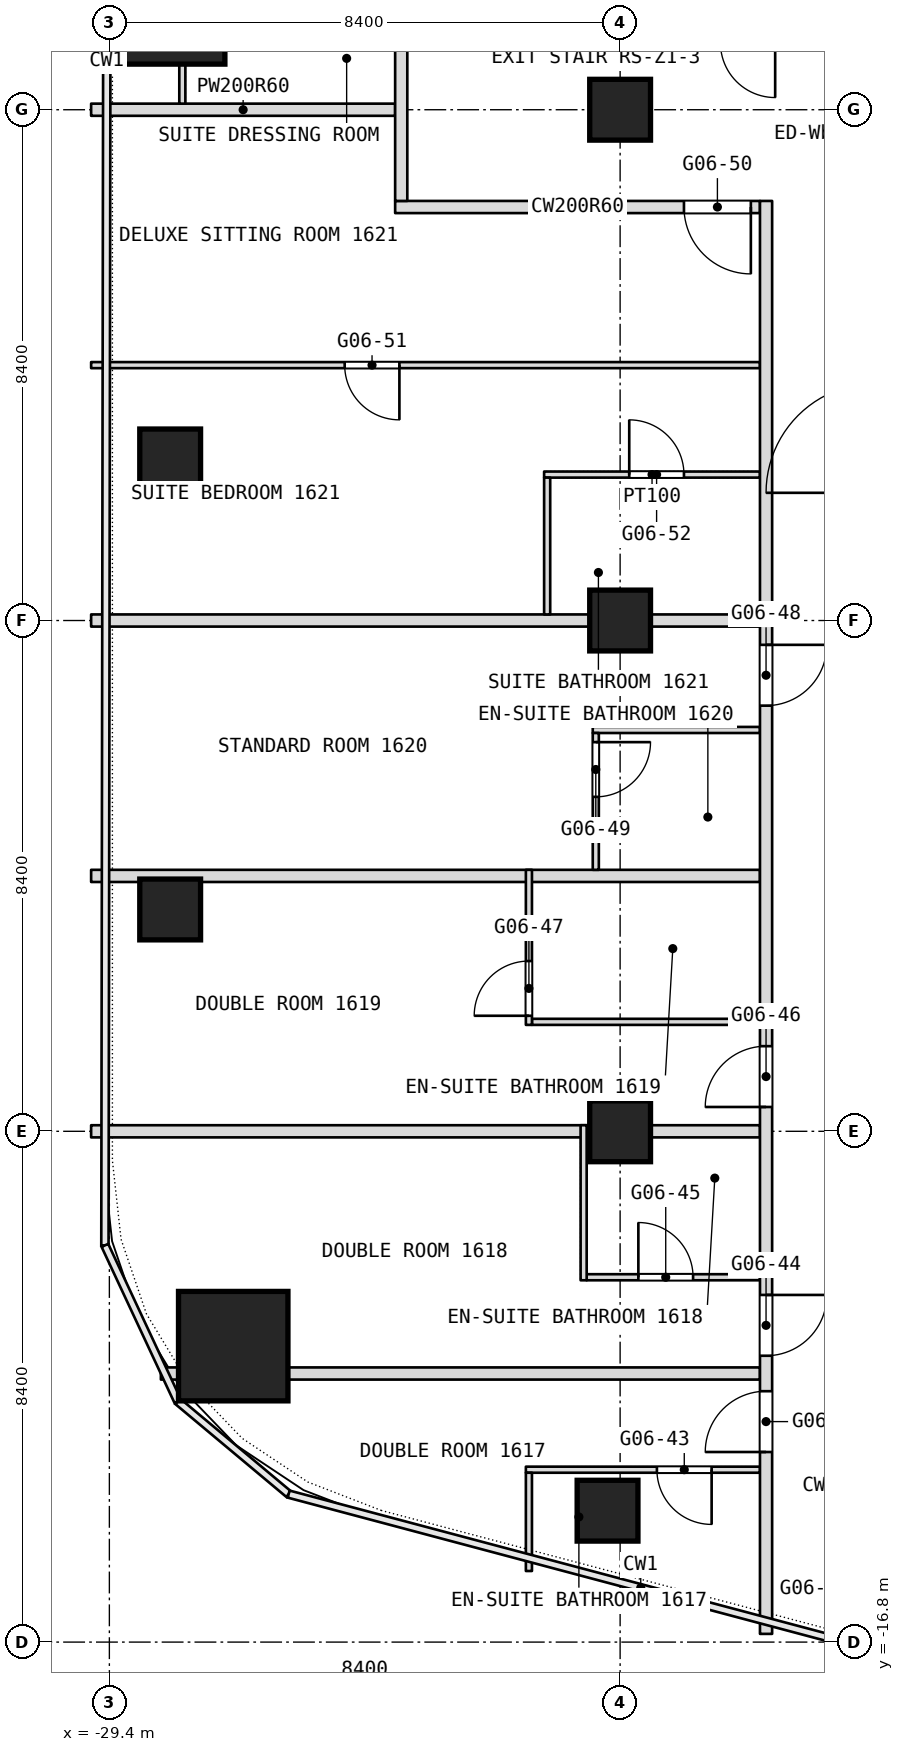
"""IFC4 building model, lengths in metres.
Left out: names, types, materials, properties, quantities, classifications, styles, units other than length and angle.
Written with IfcOpenShell. Run it as: python <this file> out.ifc"""

import sys

from ifc_helpers import new_model, si_unit, direction, frame, frame_2d, origin, origin_2d, place, context, subcontext, project, spatial, rectangle, extrude, element, fill, save


model = new_model("IFC4")
c1 = context("Model", 3, precision=1e-05, world=origin(), true_north=direction((0.0, 1.0)))
c2 = subcontext(c1, "Body", "Model", "MODEL_VIEW")
j1 = project(units=[si_unit("LENGTHUNIT", "METRE"), si_unit("PLANEANGLEUNIT", "RADIAN")], contexts=[c1])
p1 = place(None, origin())
s1 = spatial("IfcSite", under=j1, at=p1, CompositionType="ELEMENT")
p2 = place(p1, origin())
s2 = spatial("IfcBuilding", under=s1, at=p2, CompositionType="ELEMENT")
p3 = place(p2, frame((0.0, 0.0, 72.5)))
s3 = spatial("IfcBuildingStorey", under=s2, at=p3, CompositionType="ELEMENT", Elevation=72.5)
for number, where, z_axis, x_axis in (
    (1, (-27.363, -11.933, 0.0), (0.0, 0.0, 1.0), (1.0, 0.0, 0.0)),
    (2, (-28.4, 10.05, 0.0), (0.0, 0.0, 1.0), (1.0, 0.0, 0.0)),
):
    element("IfcColumn", number, at=place(p3, frame(where, z_axis=z_axis, x_axis=x_axis)), inside=s3, PredefinedType="COLUMN", context=c2, shape_type="SweptSolid", body=[
        extrude(rectangle(XDim=1.8, YDim=1.8, at=origin_2d()), origin(), (0.0, 0.0, 1.0), 3.6),
    ])
for number, where, z_axis, x_axis in (
    (3, (-21.0, -8.4, 0.0), (0.0, 0.0, 1.0), (1.0, 0.0, 0.0)),
    (4, (-21.0, 0.0, 0.0), (0.0, 0.0, 1.0), (1.0, 0.0, 0.0)),
    (5, (-21.0, 8.4, 0.0), (0.0, 0.0, 1.0), (1.0, 0.0, 0.0)),
    (6, (-28.4, -4.752, 0.0), (0.0, 0.0, 1.0), (1.0, 0.0, 0.0)),
    (7, (-28.4, 2.649, 0.0), (0.0, 0.0, 1.0), (1.0, 0.0, 0.0)),
    (8, (-21.207, -14.639, 0.0), (0.0, 0.0, 1.0), (1.0, 0.0, 0.0)),
):
    element("IfcColumn", number, at=place(p3, frame(where, z_axis=z_axis, x_axis=x_axis)), inside=s3, PredefinedType="COLUMN", context=c2, shape_type="SweptSolid", body=[
        extrude(rectangle(XDim=1.0, YDim=1.0, at=origin_2d()), origin(), (0.0, 0.0, 1.0), 3.6),
    ])
p4 = place(p3, frame((-22.55, -13.965, 0.0), z_axis=(0.0, 0.0, 1.0), x_axis=(1.0, 0.0, 0.0)))
e9 = element("IfcWall", 9, at=p4, inside=s3, PredefinedType="PARTITIONING", context=c2, shape_type="SweptSolid", body=[
    extrude(rectangle(XDim=3.85, YDim=0.1, at=frame_2d((1.925, 0.0))), origin(), (0.0, 0.0, 1.0), 3.34),
])
p5 = place(p4, frame((2.155, 0.0, 0.0)))
e10 = element("IfcOpeningElement", 10, at=p5, cuts=e9, PredefinedType="OPENING", context=c2, shape_type="SweptSolid", body=[
    extrude(rectangle(XDim=0.9, YDim=2.1, at=frame_2d((0.45, 1.05))), frame((0.0, 0.05, 0.0), z_axis=(0.0, -1.0, 0.0), x_axis=(1.0, 0.0, 0.0)), (0.0, 0.0, 1.0), 0.1),
])
p6 = place(p3, frame((-28.553, -12.383, 0.0), z_axis=(0.0, 0.0, 1.0), x_axis=(1.0, 0.0, 0.0)))
e11 = element("IfcWall", 11, at=p6, inside=s3, PredefinedType="PARTITIONING", context=c2, shape_type="SweptSolid", body=[
    extrude(rectangle(XDim=0.29, YDim=0.2, at=frame_2d((0.145, 0.0))), origin(), (0.0, 0.0, 1.0), 3.34),
])
p7 = place(p3, frame((-26.463, -12.383, 0.0), z_axis=(0.0, 0.0, 1.0), x_axis=(1.0, 0.0, 0.0)))
e12 = element("IfcWall", 12, at=p7, inside=s3, PredefinedType="PARTITIONING", context=c2, shape_type="SweptSolid", body=[
    extrude(rectangle(XDim=7.763, YDim=0.2, at=frame_2d((3.881, 0.0))), origin(), (0.0, 0.0, 1.0), 3.34),
])
p8 = place(p3, frame((-21.55, -10.8, 0.0), z_axis=(0.0, 0.0, 1.0), x_axis=(1.0, 0.0, 0.0)))
e13 = element("IfcWall", 13, at=p8, inside=s3, PredefinedType="PARTITIONING", context=c2, shape_type="SweptSolid", body=[
    extrude(rectangle(XDim=2.85, YDim=0.1, at=frame_2d((1.425, 0.0))), origin(), (0.0, 0.0, 1.0), 3.34),
])
p9 = place(p8, frame((0.85, 0.0, 0.0)))
e14 = element("IfcOpeningElement", 14, at=p9, cuts=e13, PredefinedType="OPENING", context=c2, shape_type="SweptSolid", body=[
    extrude(rectangle(XDim=0.9, YDim=2.1, at=frame_2d((0.45, 1.05))), frame((0.0, 0.05, 0.0), z_axis=(0.0, -1.0, 0.0), x_axis=(1.0, 0.0, 0.0)), (0.0, 0.0, 1.0), 0.1),
])
p10 = place(p3, frame((-29.7, -8.4, 0.0), z_axis=(0.0, 0.0, 1.0), x_axis=(1.0, 0.0, 0.0)))
e15 = element("IfcWall", 15, at=p10, inside=s3, PredefinedType="PARTITIONING", context=c2, shape_type="SweptSolid", body=[
    extrude(rectangle(XDim=11.0, YDim=0.2, at=frame_2d((5.5, 0.0))), origin(), (0.0, 0.0, 1.0), 2.84),
])
p11 = place(p3, frame((-22.45, -6.6, 0.0), z_axis=(0.0, 0.0, 1.0), x_axis=(1.0, 0.0, 0.0)))
e16 = element("IfcWall", 16, at=p11, inside=s3, PredefinedType="PARTITIONING", context=c2, shape_type="SweptSolid", body=[
    extrude(rectangle(XDim=3.75, YDim=0.1, at=frame_2d((1.875, 0.0))), origin(), (0.0, 0.0, 1.0), 3.34),
])
p12 = place(p3, frame((-29.7, -4.2, 0.0), z_axis=(0.0, 0.0, 1.0), x_axis=(1.0, 0.0, 0.0)))
e17 = element("IfcWall", 17, at=p12, inside=s3, PredefinedType="PARTITIONING", context=c2, shape_type="SweptSolid", body=[
    extrude(rectangle(XDim=11.0, YDim=0.2, at=frame_2d((5.5, 0.0))), origin(), (0.0, 0.0, 1.0), 3.34),
])
p13 = place(p3, frame((-21.45, -1.8, 0.0), z_axis=(0.0, 0.0, 1.0), x_axis=(1.0, 0.0, 0.0)))
e18 = element("IfcWall", 18, at=p13, inside=s3, PredefinedType="PARTITIONING", context=c2, shape_type="SweptSolid", body=[
    extrude(rectangle(XDim=2.75, YDim=0.1, at=frame_2d((1.375, 0.0))), origin(), (0.0, 0.0, 1.0), 3.34),
])
p14 = place(p3, frame((-29.7, 0.0, 0.0), z_axis=(0.0, 0.0, 1.0), x_axis=(1.0, 0.0, 0.0)))
e19 = element("IfcWall", 19, at=p14, inside=s3, PredefinedType="PARTITIONING", context=c2, shape_type="SweptSolid", body=[
    extrude(rectangle(XDim=11.0, YDim=0.2, at=frame_2d((5.5, 0.0))), origin(), (0.0, 0.0, 1.0), 2.84),
])
p15 = place(p3, frame((-22.25, 2.4, 0.0), z_axis=(0.0, 0.0, 1.0), x_axis=(1.0, 0.0, 0.0)))
e20 = element("IfcWall", 20, at=p15, inside=s3, PredefinedType="PARTITIONING", context=c2, shape_type="SweptSolid", body=[
    extrude(rectangle(XDim=3.55, YDim=0.1, at=frame_2d((1.775, 0.0))), origin(), (0.0, 0.0, 1.0), 3.34),
])
p16 = place(p15, frame((1.4, 0.0, 0.0)))
e21 = element("IfcOpeningElement", 21, at=p16, cuts=e20, PredefinedType="OPENING", context=c2, shape_type="SweptSolid", body=[
    extrude(rectangle(XDim=0.9, YDim=2.1, at=frame_2d((0.45, 1.05))), frame((0.0, 0.05, 0.0), z_axis=(0.0, -1.0, 0.0), x_axis=(1.0, 0.0, 0.0)), (0.0, 0.0, 1.0), 0.1),
])
p17 = place(p3, frame((-29.7, 4.2, 0.0), z_axis=(0.0, 0.0, 1.0), x_axis=(1.0, 0.0, 0.0)))
e22 = element("IfcWall", 22, at=p17, inside=s3, PredefinedType="PARTITIONING", context=c2, shape_type="SweptSolid", body=[
    extrude(rectangle(XDim=11.0, YDim=0.1, at=frame_2d((5.5, 0.0))), origin(), (0.0, 0.0, 1.0), 3.34),
])
p18 = place(p17, frame((4.17, 0.0, 0.0)))
e23 = element("IfcOpeningElement", 23, at=p18, cuts=e22, PredefinedType="OPENING", context=c2, shape_type="SweptSolid", body=[
    extrude(rectangle(XDim=0.9, YDim=2.1, at=frame_2d((0.45, 1.05))), frame((0.0, 0.05, 0.0), z_axis=(0.0, -1.0, 0.0), x_axis=(1.0, 0.0, 0.0)), (0.0, 0.0, 1.0), 0.1),
])
p19 = place(p3, frame((-24.7, 6.8, 0.0), z_axis=(0.0, 0.0, 1.0), x_axis=(1.0, 0.0, 0.0)))
e24 = element("IfcWall", 24, at=p19, inside=s3, PredefinedType="PARTITIONING", context=c2, shape_type="SweptSolid", body=[
    extrude(rectangle(XDim=6.0, YDim=0.2, at=frame_2d((3.0, 0.0))), origin(), (0.0, 0.0, 1.0), 3.34),
])
p20 = place(p19, frame((4.75, 0.0, 0.0)))
e25 = element("IfcOpeningElement", 25, at=p20, cuts=e24, PredefinedType="OPENING", context=c2, shape_type="SweptSolid", body=[
    extrude(rectangle(XDim=1.1, YDim=2.1, at=frame_2d((0.55, 1.05))), frame((0.0, 0.1, 0.0), z_axis=(0.0, -1.0, 0.0), x_axis=(1.0, 0.0, 0.0)), (0.0, 0.0, 1.0), 0.2),
])
p21 = place(p3, frame((-29.7, 8.4, 0.0), z_axis=(0.0, 0.0, 1.0), x_axis=(1.0, 0.0, 0.0)))
e26 = element("IfcWall", 26, at=p21, inside=s3, PredefinedType="PARTITIONING", context=c2, shape_type="SweptSolid", body=[
    extrude(rectangle(XDim=5.0, YDim=0.2, at=frame_2d((2.5, 0.0))), origin(), (0.0, 0.0, 1.0), 2.84),
])
p22 = place(p3, frame((-18.6, -16.665, 0.0), z_axis=(0.0, 0.0, 1.0), x_axis=(0.0, 1.0, 0.0)))
e27 = element("IfcWall", 27, at=p22, inside=s3, PredefinedType="PARTITIONING", context=c2, shape_type="SweptSolid", body=[
    extrude(rectangle(XDim=23.565, YDim=0.2, at=frame_2d((11.782, 0.0))), origin(), (0.0, 0.0, 1.0), 3.34),
])
p23 = place(p22, frame((2.991, 0.0, 0.0)))
e28 = element("IfcOpeningElement", 28, at=p23, cuts=e27, PredefinedType="OPENING", context=c2, shape_type="SweptSolid", body=[
    extrude(rectangle(XDim=1.0, YDim=2.1, at=frame_2d((0.5, 1.05))), frame((0.0, 0.1, 0.0), z_axis=(0.0, -1.0, 0.0), x_axis=(1.0, 0.0, 0.0)), (0.0, 0.0, 1.0), 0.2),
])
p24 = place(p22, frame((4.574, 0.0, 0.0)))
e29 = element("IfcOpeningElement", 29, at=p24, cuts=e27, PredefinedType="OPENING", context=c2, shape_type="SweptSolid", body=[
    extrude(rectangle(XDim=1.0, YDim=2.1, at=frame_2d((0.5, 1.05))), frame((0.0, 0.1, 0.0), z_axis=(0.0, -1.0, 0.0), x_axis=(1.0, 0.0, 0.0)), (0.0, 0.0, 1.0), 0.2),
])
p25 = place(p22, frame((8.665, 0.0, 0.0)))
e30 = element("IfcOpeningElement", 30, at=p25, cuts=e27, PredefinedType="OPENING", context=c2, shape_type="SweptSolid", body=[
    extrude(rectangle(XDim=1.0, YDim=2.1, at=frame_2d((0.5, 1.05))), frame((0.0, 0.1, 0.0), z_axis=(0.0, -1.0, 0.0), x_axis=(1.0, 0.0, 0.0)), (0.0, 0.0, 1.0), 0.2),
])
p26 = place(p22, frame((15.265, 0.0, 0.0)))
e31 = element("IfcOpeningElement", 31, at=p26, cuts=e27, PredefinedType="OPENING", context=c2, shape_type="SweptSolid", body=[
    extrude(rectangle(XDim=1.0, YDim=2.1, at=frame_2d((0.5, 1.05))), frame((0.0, 0.1, 0.0), z_axis=(0.0, -1.0, 0.0), x_axis=(1.0, 0.0, 0.0)), (0.0, 0.0, 1.0), 0.2),
])
p27 = place(p3, frame((-21.4, -4.1, 0.0), z_axis=(0.0, 0.0, 1.0), x_axis=(0.0, 1.0, 0.0)))
e32 = element("IfcWall", 32, at=p27, inside=s3, PredefinedType="PARTITIONING", context=c2, shape_type="SweptSolid", body=[
    extrude(rectangle(XDim=2.25, YDim=0.1, at=frame_2d((1.125, 0.0))), origin(), (0.0, 0.0, 1.0), 3.34),
])
p28 = place(p27, frame((1.2, 0.0, 0.0)))
e33 = element("IfcOpeningElement", 33, at=p28, cuts=e32, PredefinedType="OPENING", context=c2, shape_type="SweptSolid", body=[
    extrude(rectangle(XDim=0.9, YDim=2.1, at=frame_2d((0.45, 1.05))), frame((0.0, 0.05, 0.0), z_axis=(0.0, -1.0, 0.0), x_axis=(1.0, 0.0, 0.0)), (0.0, 0.0, 1.0), 0.1),
])
p29 = place(p3, frame((-21.6, -10.85, 0.0), z_axis=(0.0, 0.0, 1.0), x_axis=(0.0, 1.0, 0.0)))
e34 = element("IfcWall", 34, at=p29, inside=s3, PredefinedType="PARTITIONING", context=c2, shape_type="SweptSolid", body=[
    extrude(rectangle(XDim=2.55, YDim=0.1, at=frame_2d((1.275, 0.0))), origin(), (0.0, 0.0, 1.0), 3.34),
])
p30 = place(p3, frame((-22.2, 0.1, 0.0), z_axis=(0.0, 0.0, 1.0), x_axis=(0.0, 1.0, 0.0)))
e35 = element("IfcWall", 35, at=p30, inside=s3, PredefinedType="PARTITIONING", context=c2, shape_type="SweptSolid", body=[
    extrude(rectangle(XDim=2.25, YDim=0.1, at=frame_2d((1.125, 0.0))), origin(), (0.0, 0.0, 1.0), 3.34),
])
p31 = place(p3, frame((-22.5, -15.631, 0.0), z_axis=(0.0, 0.0, 1.0), x_axis=(0.0, 1.0, 0.0)))
e36 = element("IfcWall", 36, at=p31, inside=s3, PredefinedType="PARTITIONING", context=c2, shape_type="SweptSolid", body=[
    extrude(rectangle(XDim=1.616, YDim=0.1, at=frame_2d((0.808, 0.0))), origin(), (0.0, 0.0, 1.0), 3.34),
])
p32 = place(p3, frame((-22.5, -6.65, 0.0), z_axis=(0.0, 0.0, 1.0), x_axis=(0.0, 1.0, 0.0)))
e37 = element("IfcWall", 37, at=p32, inside=s3, PredefinedType="PARTITIONING", context=c2, shape_type="SweptSolid", body=[
    extrude(rectangle(XDim=2.55, YDim=0.1, at=frame_2d((1.275, 0.0))), origin(), (0.0, 0.0, 1.0), 3.34),
])
p33 = place(p32, frame((0.15, 0.0, 0.0)))
e38 = element("IfcOpeningElement", 38, at=p33, cuts=e37, PredefinedType="OPENING", context=c2, shape_type="SweptSolid", body=[
    extrude(rectangle(XDim=0.9, YDim=2.1, at=frame_2d((0.45, 1.05))), frame((0.0, 0.05, 0.0), z_axis=(0.0, -1.0, 0.0), x_axis=(1.0, 0.0, 0.0)), (0.0, 0.0, 1.0), 0.1),
])
p34 = place(p3, frame((-24.6, 6.9, 0.0), z_axis=(0.0, 0.0, 1.0), x_axis=(0.0, 1.0, 0.0)))
e39 = element("IfcWall", 39, at=p34, inside=s3, PredefinedType="PARTITIONING", context=c2, shape_type="SweptSolid", body=[
    extrude(rectangle(XDim=11.6, YDim=0.2, at=frame_2d((5.8, 0.0))), origin(), (0.0, 0.0, 1.0), 3.34),
])
p35 = place(p34, frame((5.1, 0.0, 0.0)))
e40 = element("IfcOpeningElement", 40, at=p35, cuts=e39, PredefinedType="OPENING", context=c2, shape_type="SweptSolid", body=[
    extrude(rectangle(XDim=1.1, YDim=2.1, at=frame_2d((0.55, 1.05))), frame((0.0, 0.1, 0.0), z_axis=(0.0, -1.0, 0.0), x_axis=(1.0, 0.0, 0.0)), (0.0, 0.0, 1.0), 0.2),
])
p36 = place(p34, frame((10.2, 0.0, 0.0)))
e41 = element("IfcOpeningElement", 41, at=p36, cuts=e39, PredefinedType="OPENING", context=c2, shape_type="SweptSolid", body=[
    extrude(rectangle(XDim=1.0, YDim=2.1, at=frame_2d((0.5, 1.05))), frame((0.0, 0.1, 0.0), z_axis=(0.0, -1.0, 0.0), x_axis=(1.0, 0.0, 0.0)), (0.0, 0.0, 1.0), 0.2),
])
p37 = place(p3, frame((-28.2, 8.5, 0.0), z_axis=(0.0, 0.0, 1.0), x_axis=(0.0, 1.0, 0.0)))
e42 = element("IfcWall", 42, at=p37, inside=s3, PredefinedType="PARTITIONING", context=c2, shape_type="SweptSolid", body=[
    extrude(rectangle(XDim=0.65, YDim=0.1, at=frame_2d((0.325, 0.0))), origin(), (0.0, 0.0, 1.0), 2.94),
])
p38 = place(p5, origin())
e43 = element("IfcDoor", 43, at=p38, inside=s3, OperationType="SINGLE_SWING_RIGHT", PredefinedType="DOOR", context=c2, shape_type="SweptSolid", body=[
    extrude(rectangle(XDim=0.9, YDim=2.1, at=frame_2d((0.45, 1.05))), frame((0.0, 0.025, 0.0), z_axis=(0.0, -1.0, 0.0), x_axis=(1.0, 0.0, 0.0)), (0.0, 0.0, 1.0), 0.05),
])
fill(e10, e43)
p39 = place(p9, origin())
e44 = element("IfcDoor", 44, at=p39, inside=s3, OperationType="SINGLE_SWING_LEFT", PredefinedType="DOOR", context=c2, shape_type="SweptSolid", body=[
    extrude(rectangle(XDim=0.9, YDim=2.1, at=frame_2d((0.45, 1.05))), frame((0.0, 0.025, 0.0), z_axis=(0.0, -1.0, 0.0), x_axis=(1.0, 0.0, 0.0)), (0.0, 0.0, 1.0), 0.05),
])
fill(e14, e44)
p40 = place(p16, origin())
e45 = element("IfcDoor", 45, at=p40, inside=s3, OperationType="SINGLE_SWING_LEFT", PredefinedType="DOOR", context=c2, shape_type="SweptSolid", body=[
    extrude(rectangle(XDim=0.9, YDim=2.1, at=frame_2d((0.45, 1.05))), frame((0.0, 0.025, 0.0), z_axis=(0.0, -1.0, 0.0), x_axis=(1.0, 0.0, 0.0)), (0.0, 0.0, 1.0), 0.05),
])
fill(e21, e45)
p41 = place(p18, origin())
e46 = element("IfcDoor", 46, at=p41, inside=s3, OperationType="SINGLE_SWING_LEFT", PredefinedType="DOOR", context=c2, shape_type="SweptSolid", body=[
    extrude(rectangle(XDim=0.9, YDim=2.1, at=frame_2d((0.45, 1.05))), frame((0.0, 0.025, 0.0), z_axis=(0.0, -1.0, 0.0), x_axis=(1.0, 0.0, 0.0)), (0.0, 0.0, 1.0), 0.05),
])
fill(e23, e46)
p42 = place(p20, origin())
e47 = element("IfcDoor", 47, at=p42, inside=s3, OperationType="SINGLE_SWING_LEFT", PredefinedType="DOOR", context=c2, shape_type="SweptSolid", body=[
    extrude(rectangle(XDim=1.1, YDim=2.1, at=frame_2d((0.55, 1.05))), frame((0.0, 0.025, 0.0), z_axis=(0.0, -1.0, 0.0), x_axis=(1.0, 0.0, 0.0)), (0.0, 0.0, 1.0), 0.05),
])
fill(e25, e47)
p43 = place(p23, origin())
e48 = element("IfcDoor", 48, at=p43, inside=s3, OperationType="SINGLE_SWING_LEFT", PredefinedType="DOOR", context=c2, shape_type="SweptSolid", body=[
    extrude(rectangle(XDim=1.0, YDim=2.1, at=frame_2d((0.5, 1.05))), frame((0.0, 0.025, 0.0), z_axis=(0.0, -1.0, 0.0), x_axis=(1.0, 0.0, 0.0)), (0.0, 0.0, 1.0), 0.05),
])
fill(e28, e48)
p44 = place(p24, origin())
e49 = element("IfcDoor", 49, at=p44, inside=s3, OperationType="SINGLE_SWING_LEFT", PredefinedType="DOOR", context=c2, shape_type="SweptSolid", body=[
    extrude(rectangle(XDim=1.0, YDim=2.1, at=frame_2d((0.5, 1.05))), frame((0.0, 0.025, 0.0), z_axis=(0.0, -1.0, 0.0), x_axis=(1.0, 0.0, 0.0)), (0.0, 0.0, 1.0), 0.05),
])
fill(e29, e49)
p45 = place(p25, origin())
e50 = element("IfcDoor", 50, at=p45, inside=s3, OperationType="SINGLE_SWING_LEFT", PredefinedType="DOOR", context=c2, shape_type="SweptSolid", body=[
    extrude(rectangle(XDim=1.0, YDim=2.1, at=frame_2d((0.5, 1.05))), frame((0.0, 0.025, 0.0), z_axis=(0.0, -1.0, 0.0), x_axis=(1.0, 0.0, 0.0)), (0.0, 0.0, 1.0), 0.05),
])
fill(e30, e50)
p46 = place(p26, origin())
e51 = element("IfcDoor", 51, at=p46, inside=s3, OperationType="SINGLE_SWING_LEFT", PredefinedType="DOOR", context=c2, shape_type="SweptSolid", body=[
    extrude(rectangle(XDim=1.0, YDim=2.1, at=frame_2d((0.5, 1.05))), frame((0.0, 0.025, 0.0), z_axis=(0.0, -1.0, 0.0), x_axis=(1.0, 0.0, 0.0)), (0.0, 0.0, 1.0), 0.05),
])
fill(e31, e51)
p47 = place(p28, origin())
e52 = element("IfcDoor", 52, at=p47, inside=s3, OperationType="SINGLE_SWING_LEFT", PredefinedType="DOOR", context=c2, shape_type="SweptSolid", body=[
    extrude(rectangle(XDim=0.9, YDim=2.1, at=frame_2d((0.45, 1.05))), frame((0.0, 0.025, 0.0), z_axis=(0.0, -1.0, 0.0), x_axis=(1.0, 0.0, 0.0)), (0.0, 0.0, 1.0), 0.05),
])
fill(e33, e52)
p48 = place(p33, origin())
e53 = element("IfcDoor", 53, at=p48, inside=s3, OperationType="SINGLE_SWING_RIGHT", PredefinedType="DOOR", context=c2, shape_type="SweptSolid", body=[
    extrude(rectangle(XDim=0.9, YDim=2.1, at=frame_2d((0.45, 1.05))), frame((0.0, 0.025, 0.0), z_axis=(0.0, -1.0, 0.0), x_axis=(1.0, 0.0, 0.0)), (0.0, 0.0, 1.0), 0.05),
])
fill(e38, e53)
save(model, sys.argv[1])
